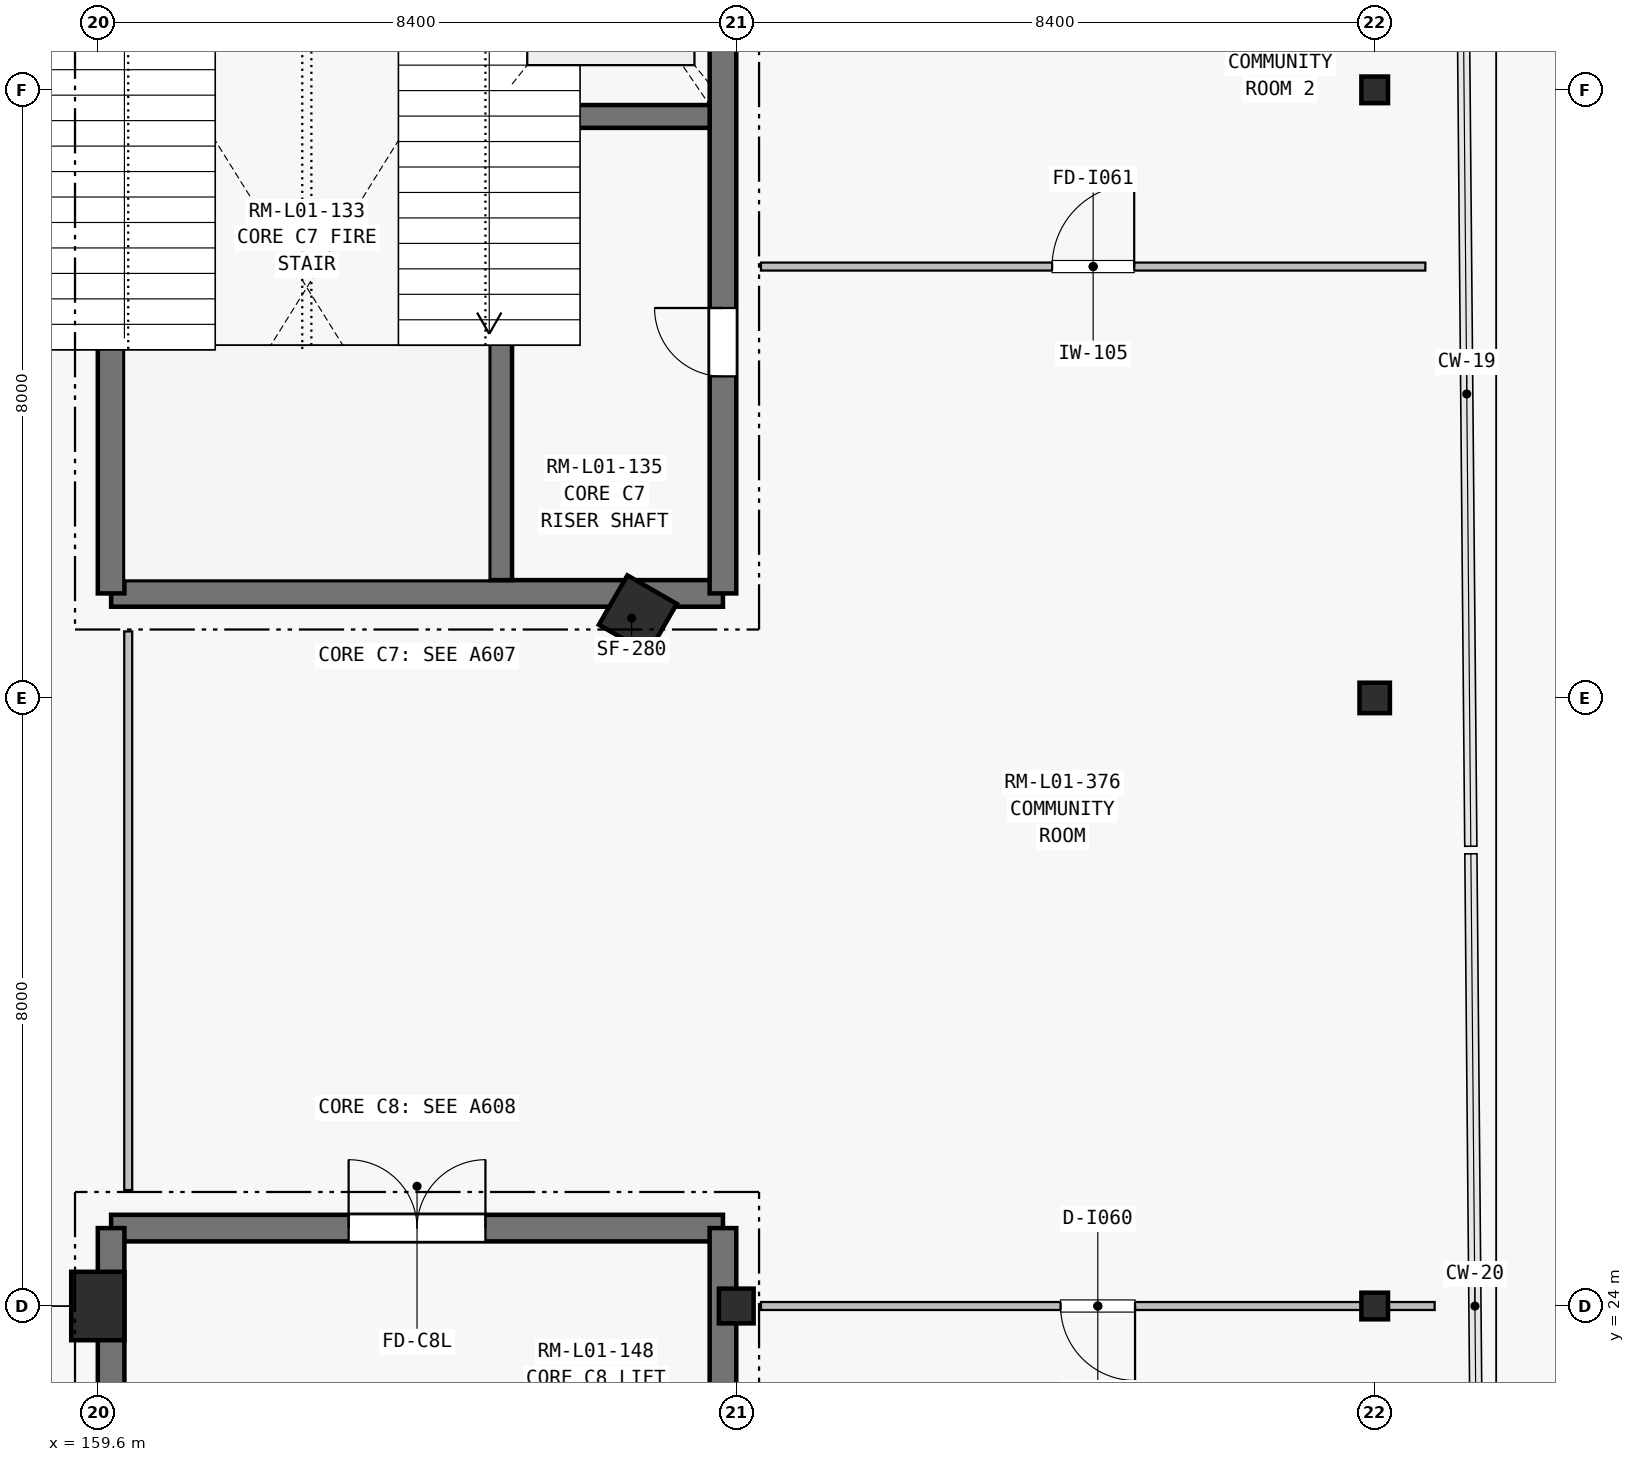
"""IFC4 building model, lengths in metres.
Left out: names, types, materials, properties, quantities, classifications, styles, units other than length and angle.
Written with IfcOpenShell. Run it as: python <this file> out.ifc"""

import sys

from ifc_helpers import new_model, si_unit, direction, frame, frame_2d, origin, origin_2d, place, context, subcontext, project, spatial, rectangle, hollow_rectangle, hollow_circle, i_section, extrude, element, fill, save


model = new_model("IFC4")
c1 = context("Model", 3, precision=1e-05, world=origin(), true_north=direction((0.0, 1.0)))
c2 = subcontext(c1, "Body", "Model", "MODEL_VIEW")
j1 = project(units=[si_unit("LENGTHUNIT", "METRE"), si_unit("PLANEANGLEUNIT", "RADIAN")], contexts=[c1])
p1 = place(None, origin())
s1 = spatial("IfcSite", under=j1, at=p1, CompositionType="ELEMENT")
p2 = place(p1, origin())
s2 = spatial("IfcBuilding", under=s1, at=p2, CompositionType="ELEMENT")
p3 = place(p2, frame((0.0, 0.0, 5.4)))
s3 = spatial("IfcBuildingStorey", under=s2, at=p3, CompositionType="ELEMENT", Elevation=5.4)
p4 = place(p3, frame((166.705, 33.1, 0.0), z_axis=(0.0, 0.0, 1.0), x_axis=(0.866025403784, -0.5, 0.0)))
e1 = element("IfcColumn", 1, at=p4, inside=s3, PredefinedType="COLUMN", context=c2, shape_type="SweptSolid", body=[
    extrude(rectangle(XDim=0.75, YDim=0.75, at=origin_2d()), origin(), (0.0, 0.0, 1.0), 4.2),
])
p5 = place(p3, frame((159.6, 24.0, 0.0), z_axis=(0.0, 0.0, 1.0), x_axis=(1.0, 0.0, 0.0)))
e2 = element("IfcColumn", 2, at=p5, inside=s3, PredefinedType="COLUMN", context=c2, shape_type="SweptSolid", body=[
    extrude(rectangle(XDim=0.7, YDim=0.9, at=origin_2d()), origin(), (0.0, 0.0, 1.0), 4.5),
])
p6 = place(p3, frame((168.0, 24.0, 0.0), z_axis=(0.0, 0.0, 1.0), x_axis=(1.0, 0.0, 0.0)))
e3 = element("IfcColumn", 3, at=p6, inside=s3, PredefinedType="COLUMN", context=c2, shape_type="SweptSolid", body=[
    extrude(hollow_circle(Radius=0.229, WallThickness=0.016, at=origin_2d()), origin(), (0.0, 0.0, 1.0), 4.5),
])
p7 = place(p3, frame((176.4, 24.0, 0.0), z_axis=(0.0, 0.0, 1.0), x_axis=(1.0, 0.0, 0.0)))
e4 = element("IfcColumn", 4, at=p7, inside=s3, PredefinedType="COLUMN", context=c2, shape_type="SweptSolid", body=[
    extrude(hollow_rectangle(XDim=0.35, YDim=0.35, WallThickness=0.016, at=origin_2d()), origin(), (0.0, 0.0, 1.0), 4.26),
])
p8 = place(p3, frame((176.4, 32.0, 0.0), z_axis=(0.0, 0.0, 1.0), x_axis=(1.0, 0.0, 0.0)))
e5 = element("IfcColumn", 5, at=p8, inside=s3, PredefinedType="COLUMN", context=c2, shape_type="SweptSolid", body=[
    extrude(i_section(OverallWidth=0.4, OverallDepth=0.4, WebThickness=0.016, FlangeThickness=0.028, at=origin_2d()), origin(), (0.0, 0.0, 1.0), 4.26),
])
p9 = place(p3, frame((176.4, 40.0, 0.0), z_axis=(0.0, 0.0, 1.0), x_axis=(1.0, 0.0, 0.0)))
e6 = element("IfcColumn", 6, at=p9, inside=s3, PredefinedType="COLUMN", context=c2, shape_type="SweptSolid", body=[
    extrude(i_section(OverallWidth=0.35, OverallDepth=0.35, WebThickness=0.014, FlangeThickness=0.024, at=origin_2d()), origin(), (0.0, 0.0, 1.0), 4.26),
])
p10 = place(p3, frame((159.775, 33.375, 0.0), z_axis=(0.0, 0.0, 1.0), x_axis=(1.0, 0.0, 0.0)))
e7 = element("IfcWall", 7, at=p10, inside=s3, PredefinedType="SHEAR", context=c2, shape_type="SweptSolid", body=[
    extrude(rectangle(XDim=8.05, YDim=0.35, at=frame_2d((4.025, 0.0))), origin(), (0.0, 0.0, 1.0), 4.5),
])
p11 = place(p3, frame((159.775, 33.375, 0.0), z_axis=(0.0, 0.0, 1.0), x_axis=(0.0, 1.0, 0.0)))
e8 = element("IfcWall", 8, at=p11, inside=s3, PredefinedType="SHEAR", context=c2, shape_type="SweptSolid", body=[
    extrude(rectangle(XDim=14.85, YDim=0.35, at=frame_2d((7.425, 0.0))), origin(), (0.0, 0.0, 1.0), 4.5),
])
p12 = place(p3, frame((167.825, 33.375, 0.0), z_axis=(0.0, 0.0, 1.0), x_axis=(0.0, 1.0, 0.0)))
e9 = element("IfcWall", 9, at=p12, inside=s3, PredefinedType="SHEAR", context=c2, shape_type="SweptSolid", body=[
    extrude(rectangle(XDim=14.85, YDim=0.35, at=frame_2d((7.425, 0.0))), origin(), (0.0, 0.0, 1.0), 4.5),
])
p13 = place(p12, frame((2.855, 0.0, 0.0)))
e10 = element("IfcOpeningElement", 10, at=p13, cuts=e9, PredefinedType="OPENING", context=c2, shape_type="SweptSolid", body=[
    extrude(rectangle(XDim=0.9, YDim=2.1, at=frame_2d((0.45, 1.05))), frame((0.0, 0.185, 0.0), z_axis=(0.0, -1.0, 0.0), x_axis=(1.0, 0.0, 0.0)), (0.0, 0.0, 1.0), 0.37),
])
p14 = place(p3, frame((164.9, 33.55, 0.0), z_axis=(0.0, 0.0, 1.0), x_axis=(0.0, 1.0, 0.0)))
e11 = element("IfcWall", 11, at=p14, inside=s3, PredefinedType="SHEAR", context=c2, shape_type="SweptSolid", body=[
    extrude(rectangle(XDim=10.35, YDim=0.3, at=frame_2d((5.175, 0.0))), origin(), (0.0, 0.0, 1.0), 4.5),
])
p15 = place(p3, frame((165.05, 39.65, 0.0), z_axis=(0.0, 0.0, 1.0), x_axis=(1.0, 0.0, 0.0)))
e12 = element("IfcWall", 12, at=p15, inside=s3, PredefinedType="SHEAR", context=c2, shape_type="SweptSolid", body=[
    extrude(rectangle(XDim=2.6, YDim=0.3, at=frame_2d((1.3, 0.0))), origin(), (0.0, 0.0, 1.0), 4.5),
])
p16 = place(p3, frame((159.775, 25.025, 0.0), z_axis=(0.0, 0.0, 1.0), x_axis=(1.0, 0.0, 0.0)))
e13 = element("IfcWall", 13, at=p16, inside=s3, PredefinedType="SHEAR", context=c2, shape_type="SweptSolid", body=[
    extrude(rectangle(XDim=8.05, YDim=0.35, at=frame_2d((4.025, 0.0))), origin(), (0.0, 0.0, 1.0), 4.5),
])
p17 = place(p16, frame((3.125, 0.0, 0.0)))
e14 = element("IfcOpeningElement", 14, at=p17, cuts=e13, PredefinedType="OPENING", context=c2, shape_type="SweptSolid", body=[
    extrude(rectangle(XDim=1.8, YDim=2.25, at=frame_2d((0.9, 1.125))), frame((0.0, 0.185, 0.0), z_axis=(0.0, -1.0, 0.0), x_axis=(1.0, 0.0, 0.0)), (0.0, 0.0, 1.0), 0.37),
])
p18 = place(p3, frame((159.775, 10.175, 0.0), z_axis=(0.0, 0.0, 1.0), x_axis=(0.0, 1.0, 0.0)))
e15 = element("IfcWall", 15, at=p18, inside=s3, PredefinedType="SHEAR", context=c2, shape_type="SweptSolid", body=[
    extrude(rectangle(XDim=14.85, YDim=0.35, at=frame_2d((7.425, 0.0))), origin(), (0.0, 0.0, 1.0), 4.5),
])
p19 = place(p3, frame((167.825, 10.175, 0.0), z_axis=(0.0, 0.0, 1.0), x_axis=(0.0, 1.0, 0.0)))
e16 = element("IfcWall", 16, at=p19, inside=s3, PredefinedType="SHEAR", context=c2, shape_type="SweptSolid", body=[
    extrude(rectangle(XDim=14.85, YDim=0.35, at=frame_2d((7.425, 0.0))), origin(), (0.0, 0.0, 1.0), 4.5),
])
p20 = place(p19, frame((2.855, 0.0, 0.0)))
e17 = element("IfcOpeningElement", 17, at=p20, cuts=e16, PredefinedType="OPENING", context=c2, shape_type="SweptSolid", body=[
    extrude(rectangle(XDim=0.9, YDim=2.1, at=frame_2d((0.45, 1.05))), frame((0.0, 0.185, 0.0), z_axis=(0.0, -1.0, 0.0), x_axis=(1.0, 0.0, 0.0)), (0.0, 0.0, 1.0), 0.37),
])
p21 = place(p3, frame((168.325, 37.675, 0.0), z_axis=(0.0, 0.0, 1.0), x_axis=(1.0, 0.0, 0.0)))
e18 = element("IfcWall", 18, at=p21, inside=s3, PredefinedType="PARTITIONING", context=c2, shape_type="SweptSolid", body=[
    extrude(rectangle(XDim=8.741, YDim=0.105, at=frame_2d((4.371, 0.0))), origin(), (0.0, 0.0, 1.0), 3.702),
])
p22 = place(p21, frame((3.831, 0.0, 0.0)))
e19 = element("IfcOpeningElement", 19, at=p22, cuts=e18, PredefinedType="OPENING", context=c2, shape_type="SweptSolid", body=[
    extrude(rectangle(XDim=1.08, YDim=2.15, at=frame_2d((0.54, 1.075))), frame((0.0, 0.062, 0.0), z_axis=(0.0, -1.0, 0.0), x_axis=(1.0, 0.0, 0.0)), (0.0, 0.0, 1.0), 0.125),
])
p23 = place(p3, frame((177.189, 24.0, 0.0), z_axis=(0.0, 0.0, 1.0), x_axis=(-1.0, 0.0, 0.0)))
e20 = element("IfcWall", 20, at=p23, inside=s3, PredefinedType="PARTITIONING", context=c2, shape_type="SweptSolid", body=[
    extrude(rectangle(XDim=8.864, YDim=0.105, at=frame_2d((4.432, 0.0))), origin(), (0.0, 0.0, 1.0), 3.573),
])
p24 = place(p23, frame((3.942, 0.0, 0.0)))
e21 = element("IfcOpeningElement", 21, at=p24, cuts=e20, PredefinedType="OPENING", context=c2, shape_type="SweptSolid", body=[
    extrude(rectangle(XDim=0.98, YDim=2.15, at=frame_2d((0.49, 1.075))), frame((0.0, 0.062, 0.0), z_axis=(0.0, -1.0, 0.0), x_axis=(1.0, 0.0, 0.0)), (0.0, 0.0, 1.0), 0.125),
])
p25 = place(p3, frame((160.0, 25.525, 0.0), z_axis=(0.0, 0.0, 1.0), x_axis=(0.0, 1.0, 0.0)))
e22 = element("IfcWall", 22, at=p25, inside=s3, PredefinedType="PARTITIONING", context=c2, shape_type="SweptSolid", body=[
    extrude(rectangle(XDim=7.35, YDim=0.105, at=frame_2d((3.675, 0.0))), origin(), (0.0, 0.0, 1.0), 4.2),
])
p26 = place(p13, origin())
e23 = element("IfcDoor", 23, at=p26, inside=s3, OperationType="SINGLE_SWING_RIGHT", PredefinedType="DOOR", context=c2, shape_type="SweptSolid", body=[
    extrude(rectangle(XDim=0.9, YDim=2.1, at=frame_2d((0.45, 1.05))), frame((0.0, 0.025, 0.0), z_axis=(0.0, -1.0, 0.0), x_axis=(1.0, 0.0, 0.0)), (0.0, 0.0, 1.0), 0.05),
])
fill(e10, e23)
p27 = place(p17, origin())
e24 = element("IfcDoor", 24, at=p27, inside=s3, OperationType="DOUBLE_DOOR_SINGLE_SWING", PredefinedType="DOOR", context=c2, shape_type="SweptSolid", body=[
    extrude(rectangle(XDim=1.8, YDim=2.25, at=frame_2d((0.9, 1.125))), frame((0.0, 0.025, 0.0), z_axis=(0.0, -1.0, 0.0), x_axis=(1.0, 0.0, 0.0)), (0.0, 0.0, 1.0), 0.05),
])
fill(e14, e24)
p28 = place(p24, origin())
e25 = element("IfcDoor", 25, at=p28, inside=s3, OperationType="SINGLE_SWING_LEFT", PredefinedType="DOOR", context=c2, shape_type="SweptSolid", body=[
    extrude(rectangle(XDim=0.98, YDim=2.15, at=frame_2d((0.49, 1.075))), frame((0.0, 0.025, 0.0), z_axis=(0.0, -1.0, 0.0), x_axis=(1.0, 0.0, 0.0)), (0.0, 0.0, 1.0), 0.05),
])
fill(e21, e25)
p29 = place(p22, origin())
e26 = element("IfcDoor", 26, at=p29, inside=s3, OperationType="SINGLE_SWING_RIGHT", PredefinedType="DOOR", context=c2, shape_type="SweptSolid", body=[
    extrude(rectangle(XDim=1.08, YDim=2.15, at=frame_2d((0.54, 1.075))), frame((0.0, 0.025, 0.0), z_axis=(0.0, -1.0, 0.0), x_axis=(1.0, 0.0, 0.0)), (0.0, 0.0, 1.0), 0.05),
])
fill(e19, e26)
save(model, sys.argv[1])
